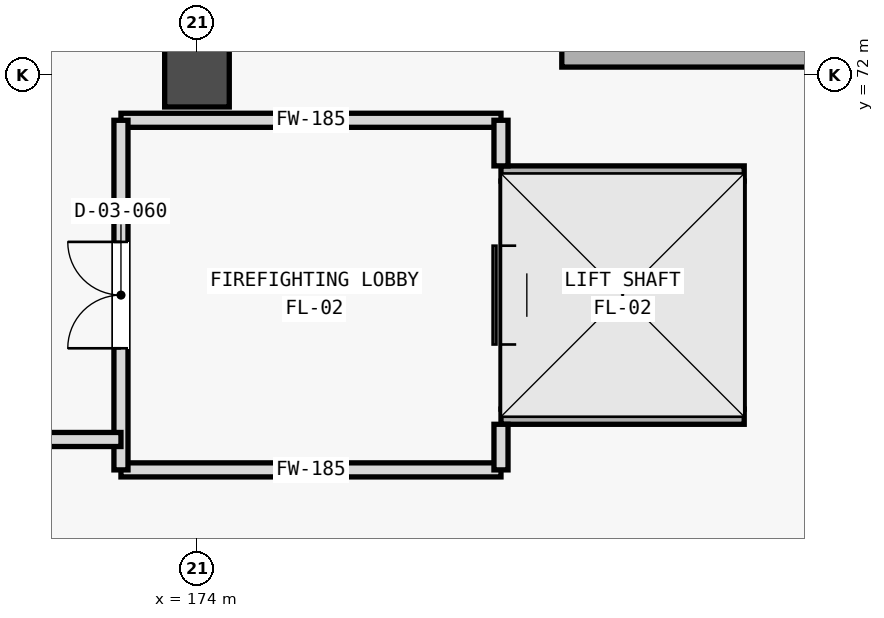
"""IFC4 building model, lengths in metres.
Left out: names, types, materials, properties, quantities, classifications, styles, units other than length and angle.
Written with IfcOpenShell. Run it as: python <this file> out.ifc"""

import sys

from ifc_helpers import new_model, si_unit, direction, frame, frame_2d, origin, origin_2d, place, context, subcontext, project, spatial, rectangle, extrude, element, fill, save


model = new_model("IFC4")
c1 = context("Model", 3, precision=1e-05, world=origin(), true_north=direction((0.0, 1.0)))
c2 = subcontext(c1, "Body", "Model", "MODEL_VIEW")
j1 = project(units=[si_unit("LENGTHUNIT", "METRE"), si_unit("PLANEANGLEUNIT", "RADIAN")], contexts=[c1])
p1 = place(None, origin())
s1 = spatial("IfcSite", under=j1, at=p1, CompositionType="ELEMENT")
p2 = place(p1, origin())
s2 = spatial("IfcBuilding", under=s1, at=p2, CompositionType="ELEMENT")
p3 = place(p2, frame((0.0, 0.0, -4.8)))
s3 = spatial("IfcBuildingStorey", under=s2, at=p3, CompositionType="ELEMENT", Elevation=-4.8)
p4 = place(p3, frame((174.0, 72.0, 0.0), z_axis=(0.0, 0.0, 1.0), x_axis=(1.0, 0.0, 0.0)))
e1 = element("IfcColumn", 1, at=p4, inside=s3, PredefinedType="COLUMN", context=c2, shape_type="SweptSolid", body=[
    extrude(rectangle(XDim=0.85, YDim=0.85, at=origin_2d()), origin(), (0.0, 0.0, 1.0), 4.5),
])
p5 = place(p3, frame((178.8, 72.225, 0.0), z_axis=(0.0, 0.0, 1.0), x_axis=(1.0, 0.0, 0.0)))
e2 = element("IfcWall", 2, at=p5, inside=s3, PredefinedType="SHEAR", context=c2, shape_type="SweptSolid", body=[
    extrude(rectangle(XDim=5.2, YDim=0.25, at=frame_2d((2.6, 0.0))), origin(), (0.0, 0.0, 1.0), 4.8),
])
for number, where, z_axis, x_axis in (
    (3, (178.0, 67.5, 0.0), (0.0, 0.0, 1.0), (1.0, 0.0, 0.0)),
    (4, (178.0, 70.7, 0.0), (0.0, 0.0, 1.0), (1.0, 0.0, 0.0)),
):
    element("IfcWall", number, at=place(p3, frame(where, z_axis=z_axis, x_axis=x_axis)), inside=s3, PredefinedType="SHEAR", context=c2, shape_type="SweptSolid", body=[
        extrude(rectangle(XDim=3.2, YDim=0.2, at=frame_2d((1.6, 0.0))), origin(), (0.0, 0.0, 1.0), 4.8),
    ])
p6 = place(p3, frame((178.1, 67.6, 0.0), z_axis=(0.0, 0.0, 1.0), x_axis=(0.0, 1.0, 0.0)))
e5 = element("IfcWall", 5, at=p6, inside=s3, PredefinedType="SHEAR", context=c2, shape_type="SweptSolid", body=[
    extrude(rectangle(XDim=3.0, YDim=0.2, at=frame_2d((1.5, 0.0))), origin(), (0.0, 0.0, 1.0), 4.8),
])
p7 = place(p6, frame((0.85, 0.0, 0.0)))
e6 = element("IfcOpeningElement", 6, at=p7, cuts=e5, PredefinedType="OPENING", context=c2, shape_type="SweptSolid", body=[
    extrude(rectangle(XDim=1.3, YDim=2.3, at=frame_2d((0.65, 1.15))), frame((0.0, 0.11, 0.0), z_axis=(0.0, -1.0, 0.0), x_axis=(1.0, 0.0, 0.0)), (0.0, 0.0, 1.0), 0.22),
])
p8 = place(p3, frame((181.1, 67.6, 0.0), z_axis=(0.0, 0.0, 1.0), x_axis=(0.0, 1.0, 0.0)))
e7 = element("IfcWall", 7, at=p8, inside=s3, PredefinedType="SHEAR", context=c2, shape_type="SweptSolid", body=[
    extrude(rectangle(XDim=3.0, YDim=0.2, at=frame_2d((1.5, 0.0))), origin(), (0.0, 0.0, 1.0), 4.8),
])
for number, where, z_axis, x_axis in (
    (8, (178.0, 66.8, 0.0), (0.0, 0.0, 1.0), (-1.0, 0.0, 0.0)),
    (9, (173.0, 71.4, 0.0), (0.0, 0.0, 1.0), (1.0, 0.0, 0.0)),
):
    element("IfcWall", number, at=place(p3, frame(where, z_axis=z_axis, x_axis=x_axis)), inside=s3, PredefinedType="STANDARD", context=c2, shape_type="SweptSolid", body=[
        extrude(rectangle(XDim=5.0, YDim=0.185, at=frame_2d((2.5, 0.0))), origin(), (0.0, 0.0, 1.0), 3.75),
    ])
p9 = place(p3, frame((173.0, 66.8, 0.0), z_axis=(0.0, 0.0, 1.0), x_axis=(0.0, 1.0, 0.0)))
e10 = element("IfcWall", 10, at=p9, inside=s3, PredefinedType="STANDARD", context=c2, shape_type="SweptSolid", body=[
    extrude(rectangle(XDim=4.6, YDim=0.185, at=frame_2d((2.3, 0.0))), origin(), (0.0, 0.0, 1.0), 3.75),
])
p10 = place(p9, frame((1.6, 0.0, 0.0)))
e11 = element("IfcOpeningElement", 11, at=p10, cuts=e10, PredefinedType="OPENING", context=c2, shape_type="SweptSolid", body=[
    extrude(rectangle(XDim=1.4, YDim=2.2, at=frame_2d((0.7, 1.1))), frame((0.0, 0.103, 0.0), z_axis=(0.0, -1.0, 0.0), x_axis=(1.0, 0.0, 0.0)), (0.0, 0.0, 1.0), 0.205),
])
for number, where, z_axis, x_axis in (
    (12, (178.0, 66.8, 0.0), (0.0, 0.0, 1.0), (0.0, 1.0, 0.0)),
    (13, (178.0, 70.8, 0.0), (0.0, 0.0, 1.0), (0.0, 1.0, 0.0)),
):
    element("IfcWall", number, at=place(p3, frame(where, z_axis=z_axis, x_axis=x_axis)), inside=s3, PredefinedType="STANDARD", context=c2, shape_type="SweptSolid", body=[
        extrude(rectangle(XDim=0.6, YDim=0.185, at=frame_2d((0.3, 0.0))), origin(), (0.0, 0.0, 1.0), 3.75),
    ])
p11 = place(p3, frame((165.0, 67.2, 0.0), z_axis=(0.0, 0.0, 1.0), x_axis=(1.0, 0.0, 0.0)))
e14 = element("IfcWall", 14, at=p11, inside=s3, PredefinedType="STANDARD", context=c2, shape_type="SweptSolid", body=[
    extrude(rectangle(XDim=8.0, YDim=0.185, at=frame_2d((4.0, 0.0))), origin(), (0.0, 0.0, 1.0), 4.15),
])
p12 = place(p7, origin())
e15 = element("IfcDoor", 15, at=p12, inside=s3, OperationType="SLIDING_TO_RIGHT", PredefinedType="DOOR", context=c2, shape_type="SweptSolid", body=[
    extrude(rectangle(XDim=1.3, YDim=2.3, at=frame_2d((0.65, 1.15))), frame((0.0, 0.025, 0.0), z_axis=(0.0, -1.0, 0.0), x_axis=(1.0, 0.0, 0.0)), (0.0, 0.0, 1.0), 0.05),
])
fill(e6, e15)
p13 = place(p10, origin())
e16 = element("IfcDoor", 16, at=p13, inside=s3, OperationType="DOUBLE_DOOR_SINGLE_SWING", PredefinedType="DOOR", context=c2, shape_type="SweptSolid", body=[
    extrude(rectangle(XDim=1.4, YDim=2.2, at=frame_2d((0.7, 1.1))), frame((0.0, 0.025, 0.0), z_axis=(0.0, -1.0, 0.0), x_axis=(1.0, 0.0, 0.0)), (0.0, 0.0, 1.0), 0.05),
])
fill(e11, e16)
save(model, sys.argv[1])
